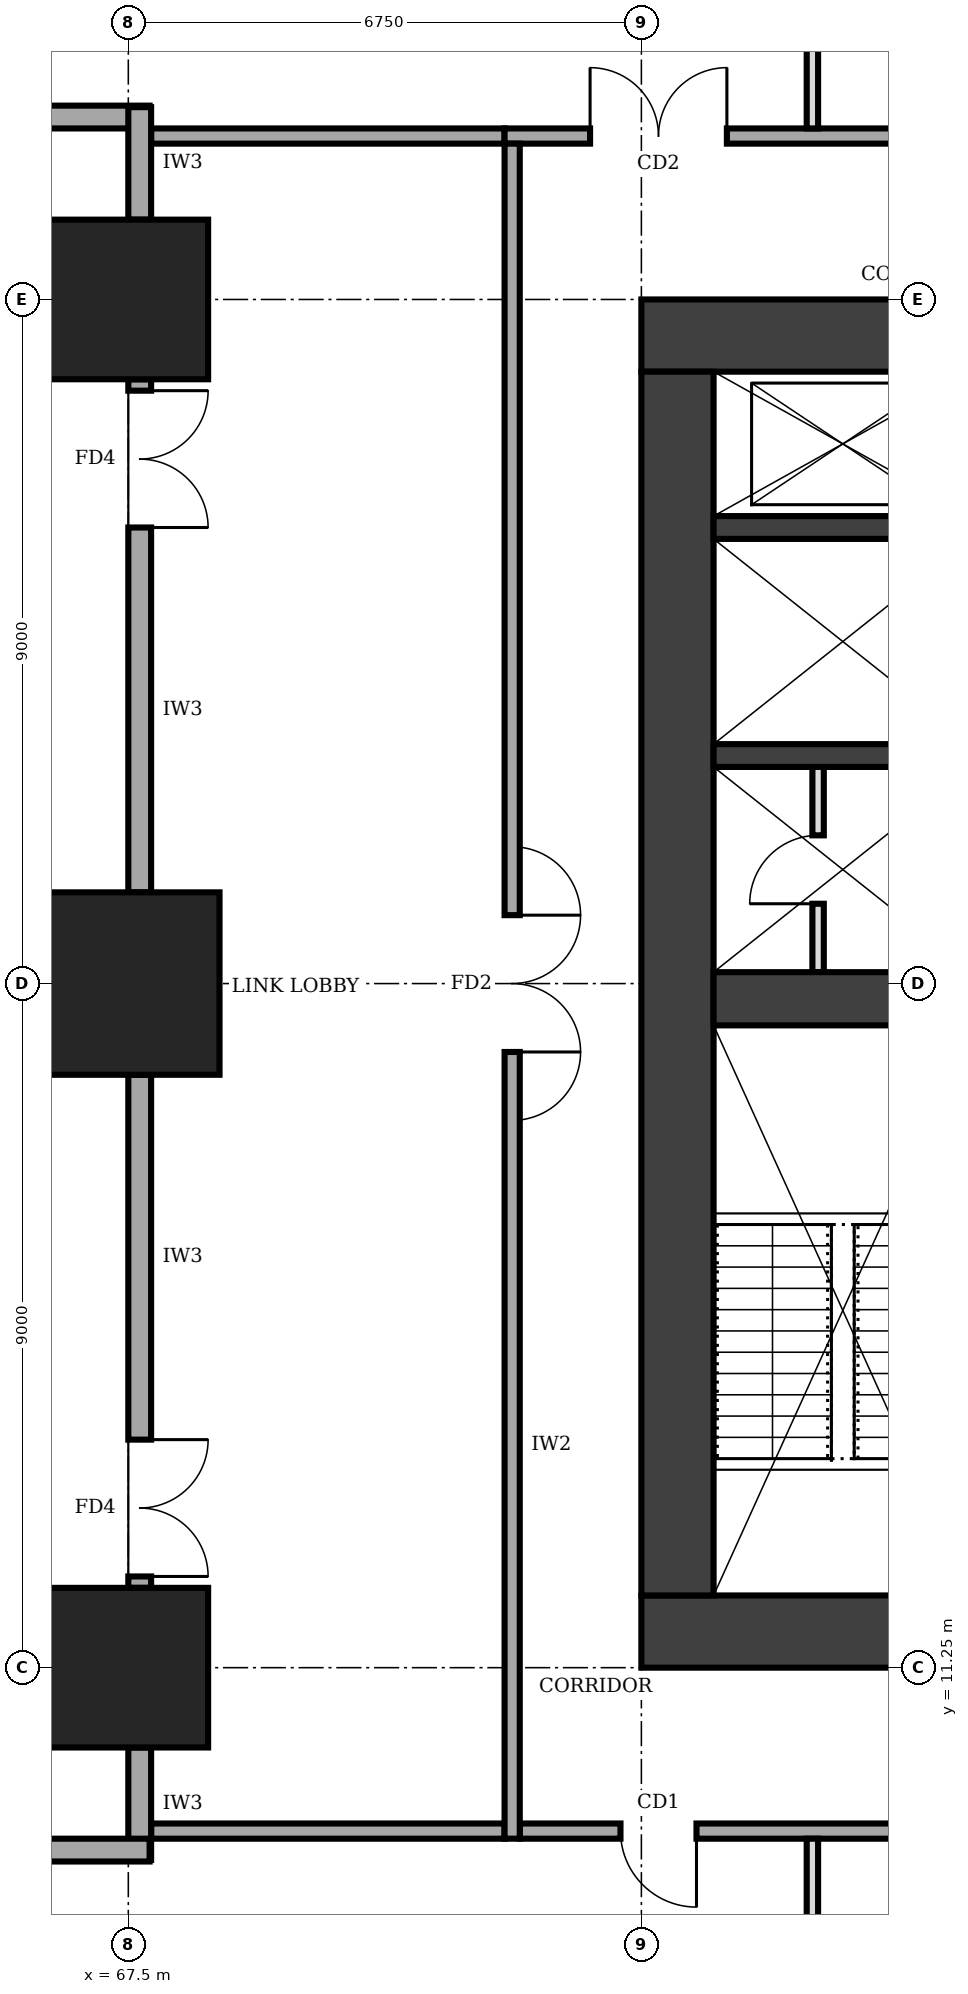
"""IFC4 building model, lengths in metres.
Left out: names, types, materials, properties, quantities, classifications, styles, units other than length and angle.
Written with IfcOpenShell. Run it as: python <this file> out.ifc"""

import sys

from ifc_helpers import new_model, si_unit, direction, frame, frame_2d, origin, origin_2d, place, context, subcontext, project, spatial, rectangle, extrude, element, fill, save


model = new_model("IFC4")
c1 = context("Model", 3, precision=1e-05, world=origin(), true_north=direction((0.0, 1.0)))
c2 = subcontext(c1, "Body", "Model", "MODEL_VIEW")
j1 = project(units=[si_unit("LENGTHUNIT", "METRE"), si_unit("PLANEANGLEUNIT", "RADIAN")], contexts=[c1])
p1 = place(None, origin())
s1 = spatial("IfcSite", under=j1, at=p1, CompositionType="ELEMENT")
p2 = place(p1, origin())
s2 = spatial("IfcBuilding", under=s1, at=p2, CompositionType="ELEMENT")
p3 = place(p2, frame((0.0, 0.0, 129.0)))
s3 = spatial("IfcBuildingStorey", under=s2, at=p3, CompositionType="ELEMENT", Elevation=129.0)
p4 = place(p3, frame((74.25, 11.725, 0.0), z_axis=(0.0, 0.0, 1.0), x_axis=(1.0, 0.0, 0.0)))
e1 = element("IfcWall", 1, at=p4, inside=s3, PredefinedType="SHEAR", context=c2, shape_type="SweptSolid", body=[
    extrude(rectangle(XDim=13.5, YDim=0.95, at=frame_2d((6.75, 0.0))), origin(), (0.0, 0.0, 1.0), 4.0),
])
p5 = place(p4, frame((4.75, 0.0, 0.0)))
e2 = element("IfcOpeningElement", 2, at=p5, cuts=e1, PredefinedType="OPENING", context=c2, shape_type="SweptSolid", body=[
    extrude(rectangle(XDim=1.0, YDim=2.1, at=frame_2d((0.5, 1.05))), frame((0.0, 0.485, 0.0), z_axis=(0.0, -1.0, 0.0), x_axis=(1.0, 0.0, 0.0)), (0.0, 0.0, 1.0), 0.97),
])
p6 = place(p3, frame((87.75, 28.775, 0.0), z_axis=(0.0, 0.0, 1.0), x_axis=(-1.0, 0.0, 0.0)))
e3 = element("IfcWall", 3, at=p6, inside=s3, PredefinedType="SHEAR", context=c2, shape_type="SweptSolid", body=[
    extrude(rectangle(XDim=13.5, YDim=0.95, at=frame_2d((6.75, 0.0))), origin(), (0.0, 0.0, 1.0), 4.0),
])
p7 = place(p6, frame((4.75, 0.0, 0.0)))
e4 = element("IfcOpeningElement", 4, at=p7, cuts=e3, PredefinedType="OPENING", context=c2, shape_type="SweptSolid", body=[
    extrude(rectangle(XDim=1.8, YDim=2.1, at=frame_2d((0.9, 1.05))), frame((0.0, 0.485, 0.0), z_axis=(0.0, -1.0, 0.0), x_axis=(1.0, 0.0, 0.0)), (0.0, 0.0, 1.0), 0.97),
])
p8 = place(p3, frame((74.725, 28.3, 0.0), z_axis=(0.0, 0.0, 1.0), x_axis=(0.0, -1.0, 0.0)))
e5 = element("IfcWall", 5, at=p8, inside=s3, PredefinedType="SHEAR", context=c2, shape_type="SweptSolid", body=[
    extrude(rectangle(XDim=16.1, YDim=0.95, at=frame_2d((8.05, 0.0))), origin(), (0.0, 0.0, 1.0), 4.0),
])
p9 = place(p3, frame((75.2, 20.05, 0.0), z_axis=(0.0, 0.0, 1.0), x_axis=(1.0, 0.0, 0.0)))
e6 = element("IfcWall", 6, at=p9, inside=s3, PredefinedType="SHEAR", context=c2, shape_type="SweptSolid", body=[
    extrude(rectangle(XDim=3.4, YDim=0.7, at=frame_2d((1.7, 0.0))), origin(), (0.0, 0.0, 1.0), 4.0),
])
for number, where, z_axis, x_axis in (
    (7, (75.2, 23.25, 0.0), (0.0, 0.0, 1.0), (1.0, 0.0, 0.0)),
    (8, (75.2, 26.25, 0.0), (0.0, 0.0, 1.0), (1.0, 0.0, 0.0)),
):
    element("IfcWall", number, at=place(p3, frame(where, z_axis=z_axis, x_axis=x_axis)), inside=s3, PredefinedType="SHEAR", context=c2, shape_type="SweptSolid", body=[
        extrude(rectangle(XDim=3.4, YDim=0.3, at=frame_2d((1.7, 0.0))), origin(), (0.0, 0.0, 1.0), 4.0),
    ])
p10 = place(p3, frame((67.5, 11.25, 0.0), z_axis=(0.0, 0.0, 1.0), x_axis=(1.0, 0.0, 0.0)))
e9 = element("IfcColumn", 9, at=p10, inside=s3, PredefinedType="COLUMN", context=c2, shape_type="SweptSolid", body=[
    extrude(rectangle(XDim=2.1, YDim=2.1, at=origin_2d()), origin(), (0.0, 0.0, 1.0), 4.0),
])
p11 = place(p3, frame((67.5, 20.25, 0.0), z_axis=(0.0, 0.0, 1.0), x_axis=(1.0, 0.0, 0.0)))
e10 = element("IfcColumn", 10, at=p11, inside=s3, PredefinedType="COLUMN", context=c2, shape_type="SweptSolid", body=[
    extrude(rectangle(XDim=2.4, YDim=2.4, at=origin_2d()), origin(), (0.0, 0.0, 1.0), 4.0),
])
p12 = place(p3, frame((67.5, 29.25, 0.0), z_axis=(0.0, 0.0, 1.0), x_axis=(1.0, 0.0, 0.0)))
e11 = element("IfcColumn", 11, at=p12, inside=s3, PredefinedType="COLUMN", context=c2, shape_type="SweptSolid", body=[
    extrude(rectangle(XDim=2.1, YDim=2.1, at=origin_2d()), origin(), (0.0, 0.0, 1.0), 4.0),
])
p13 = place(p3, frame((63.02, 31.65, 0.0), z_axis=(0.0, 0.0, 1.0), x_axis=(1.0, 0.0, 0.0)))
e12 = element("IfcWall", 12, at=p13, inside=s3, PredefinedType="SOLIDWALL", context=c2, shape_type="SweptSolid", body=[
    extrude(rectangle(XDim=4.76, YDim=0.3, at=frame_2d((2.38, 0.0))), origin(), (0.0, 0.0, 1.0), 3.75),
])
p14 = place(p3, frame((67.65, 31.78, 0.0), z_axis=(0.0, 0.0, 1.0), x_axis=(0.0, -1.0, 0.0)))
e13 = element("IfcWall", 13, at=p14, inside=s3, PredefinedType="SOLIDWALL", context=c2, shape_type="SweptSolid", body=[
    extrude(rectangle(XDim=1.48, YDim=0.3, at=frame_2d((0.74, 0.0))), origin(), (0.0, 0.0, 1.0), 2.65),
])
p15 = place(p3, frame((67.65, 28.2, 0.0), z_axis=(0.0, 0.0, 1.0), x_axis=(0.0, -1.0, 0.0)))
e14 = element("IfcWall", 14, at=p15, inside=s3, PredefinedType="SOLIDWALL", context=c2, shape_type="SweptSolid", body=[
    extrude(rectangle(XDim=6.75, YDim=0.3, at=frame_2d((3.375, 0.0))), origin(), (0.0, 0.0, 1.0), 2.65),
])
p16 = place(p15, frame((0.15, 0.0, 0.0)))
e15 = element("IfcOpeningElement", 15, at=p16, cuts=e14, PredefinedType="OPENING", context=c2, shape_type="SweptSolid", body=[
    extrude(rectangle(XDim=1.8, YDim=2.1, at=frame_2d((0.9, 1.05))), frame((0.0, 0.16, 0.0), z_axis=(0.0, -1.0, 0.0), x_axis=(1.0, 0.0, 0.0)), (0.0, 0.0, 1.0), 0.32),
])
p17 = place(p3, frame((67.65, 19.05, 0.0), z_axis=(0.0, 0.0, 1.0), x_axis=(0.0, -1.0, 0.0)))
e16 = element("IfcWall", 16, at=p17, inside=s3, PredefinedType="SOLIDWALL", context=c2, shape_type="SweptSolid", body=[
    extrude(rectangle(XDim=6.75, YDim=0.3, at=frame_2d((3.375, 0.0))), origin(), (0.0, 0.0, 1.0), 2.65),
])
p18 = place(p17, frame((4.8, 0.0, 0.0)))
e17 = element("IfcOpeningElement", 17, at=p18, cuts=e16, PredefinedType="OPENING", context=c2, shape_type="SweptSolid", body=[
    extrude(rectangle(XDim=1.8, YDim=2.1, at=frame_2d((0.9, 1.05))), frame((0.0, 0.16, 0.0), z_axis=(0.0, -1.0, 0.0), x_axis=(1.0, 0.0, 0.0)), (0.0, 0.0, 1.0), 0.32),
])
p19 = place(p3, frame((67.65, 10.2, 0.0), z_axis=(0.0, 0.0, 1.0), x_axis=(0.0, -1.0, 0.0)))
e18 = element("IfcWall", 18, at=p19, inside=s3, PredefinedType="SOLIDWALL", context=c2, shape_type="SweptSolid", body=[
    extrude(rectangle(XDim=1.48, YDim=0.3, at=frame_2d((0.74, 0.0))), origin(), (0.0, 0.0, 1.0), 2.65),
])
p20 = place(p3, frame((67.78, 8.85, 0.0), z_axis=(0.0, 0.0, 1.0), x_axis=(-1.0, 0.0, 0.0)))
e19 = element("IfcWall", 19, at=p20, inside=s3, PredefinedType="SOLIDWALL", context=c2, shape_type="SweptSolid", body=[
    extrude(rectangle(XDim=4.76, YDim=0.3, at=frame_2d((2.38, 0.0))), origin(), (0.0, 0.0, 1.0), 3.75),
])
p21 = place(p3, frame((76.575, 20.4, 0.0), z_axis=(0.0, 0.0, 1.0), x_axis=(0.0, 1.0, 0.0)))
e20 = element("IfcWall", 20, at=p21, inside=s3, PredefinedType="PARTITIONING", context=c2, shape_type="SweptSolid", body=[
    extrude(rectangle(XDim=2.7, YDim=0.15, at=frame_2d((1.35, 0.0))), origin(), (0.0, 0.0, 1.0), 3.75),
])
p22 = place(p21, frame((0.9, 0.0, 0.0)))
e21 = element("IfcOpeningElement", 21, at=p22, cuts=e20, PredefinedType="OPENING", context=c2, shape_type="SweptSolid", body=[
    extrude(rectangle(XDim=0.9, YDim=2.1, at=frame_2d((0.45, 1.05))), frame((0.0, 0.085, 0.0), z_axis=(0.0, -1.0, 0.0), x_axis=(1.0, 0.0, 0.0)), (0.0, 0.0, 1.0), 0.17),
])
p23 = place(p3, frame((72.65, 9.1, 0.0), z_axis=(0.0, 0.0, 1.0), x_axis=(1.0, 0.0, 0.0)))
e22 = element("IfcWall", 22, at=p23, inside=s3, PredefinedType="SOLIDWALL", context=c2, shape_type="SweptSolid", body=[
    extrude(rectangle(XDim=16.9, YDim=0.2, at=frame_2d((8.45, 0.0))), origin(), (0.0, 0.0, 1.0), 3.75),
])
p24 = place(p23, frame((1.325, 0.0, 0.0)))
e23 = element("IfcOpeningElement", 23, at=p24, cuts=e22, PredefinedType="OPENING", context=c2, shape_type="SweptSolid", body=[
    extrude(rectangle(XDim=1.0, YDim=2.1, at=frame_2d((0.5, 1.05))), frame((0.0, 0.11, 0.0), z_axis=(0.0, -1.0, 0.0), x_axis=(1.0, 0.0, 0.0)), (0.0, 0.0, 1.0), 0.22),
])
p25 = place(p23, frame((5.6, 0.0, 0.0)))
e24 = element("IfcOpeningElement", 24, at=p25, cuts=e22, PredefinedType="OPENING", context=c2, shape_type="SweptSolid", body=[
    extrude(rectangle(XDim=1.0, YDim=2.1, at=frame_2d((0.5, 1.05))), frame((0.0, 0.11, 0.0), z_axis=(0.0, -1.0, 0.0), x_axis=(1.0, 0.0, 0.0)), (0.0, 0.0, 1.0), 0.22),
])
p26 = place(p23, frame((12.125, 0.0, 0.0)))
e25 = element("IfcOpeningElement", 25, at=p26, cuts=e22, PredefinedType="OPENING", context=c2, shape_type="SweptSolid", body=[
    extrude(rectangle(XDim=1.0, YDim=2.1, at=frame_2d((0.5, 1.05))), frame((0.0, 0.11, 0.0), z_axis=(0.0, -1.0, 0.0), x_axis=(1.0, 0.0, 0.0)), (0.0, 0.0, 1.0), 0.22),
])
p27 = place(p3, frame((89.35, 31.4, 0.0), z_axis=(0.0, 0.0, 1.0), x_axis=(-1.0, 0.0, 0.0)))
e26 = element("IfcWall", 26, at=p27, inside=s3, PredefinedType="SOLIDWALL", context=c2, shape_type="SweptSolid", body=[
    extrude(rectangle(XDim=16.9, YDim=0.2, at=frame_2d((8.45, 0.0))), origin(), (0.0, 0.0, 1.0), 3.75),
])
p28 = place(p27, frame((13.975, 0.0, 0.0)))
e27 = element("IfcOpeningElement", 27, at=p28, cuts=e26, PredefinedType="OPENING", context=c2, shape_type="SweptSolid", body=[
    extrude(rectangle(XDim=1.8, YDim=2.1, at=frame_2d((0.9, 1.05))), frame((0.0, 0.11, 0.0), z_axis=(0.0, -1.0, 0.0), x_axis=(1.0, 0.0, 0.0)), (0.0, 0.0, 1.0), 0.22),
])
p29 = place(p27, frame((7.85, 0.0, 0.0)))
e28 = element("IfcOpeningElement", 28, at=p29, cuts=e26, PredefinedType="OPENING", context=c2, shape_type="SweptSolid", body=[
    extrude(rectangle(XDim=1.0, YDim=2.1, at=frame_2d((0.5, 1.05))), frame((0.0, 0.11, 0.0), z_axis=(0.0, -1.0, 0.0), x_axis=(1.0, 0.0, 0.0)), (0.0, 0.0, 1.0), 0.22),
])
p30 = place(p27, frame((1.325, 0.0, 0.0)))
e29 = element("IfcOpeningElement", 29, at=p30, cuts=e26, PredefinedType="OPENING", context=c2, shape_type="SweptSolid", body=[
    extrude(rectangle(XDim=1.0, YDim=2.1, at=frame_2d((0.5, 1.05))), frame((0.0, 0.11, 0.0), z_axis=(0.0, -1.0, 0.0), x_axis=(1.0, 0.0, 0.0)), (0.0, 0.0, 1.0), 0.22),
])
p31 = place(p3, frame((72.55, 31.3, 0.0), z_axis=(0.0, 0.0, 1.0), x_axis=(0.0, -1.0, 0.0)))
e30 = element("IfcWall", 30, at=p31, inside=s3, PredefinedType="SOLIDWALL", context=c2, shape_type="SweptSolid", body=[
    extrude(rectangle(XDim=22.3, YDim=0.2, at=frame_2d((11.15, 0.0))), origin(), (0.0, 0.0, 1.0), 3.75),
])
p32 = place(p31, frame((10.15, 0.0, 0.0)))
e31 = element("IfcOpeningElement", 31, at=p32, cuts=e30, PredefinedType="OPENING", context=c2, shape_type="SweptSolid", body=[
    extrude(rectangle(XDim=1.8, YDim=2.1, at=frame_2d((0.9, 1.05))), frame((0.0, 0.11, 0.0), z_axis=(0.0, -1.0, 0.0), x_axis=(1.0, 0.0, 0.0)), (0.0, 0.0, 1.0), 0.22),
])
for number, where, z_axis, x_axis in (
    (32, (67.8, 9.1, 0.0), (0.0, 0.0, 1.0), (1.0, 0.0, 0.0)),
    (33, (67.8, 31.4, 0.0), (0.0, 0.0, 1.0), (1.0, 0.0, 0.0)),
):
    element("IfcWall", number, at=place(p3, frame(where, z_axis=z_axis, x_axis=x_axis)), inside=s3, PredefinedType="SOLIDWALL", context=c2, shape_type="SweptSolid", body=[
        extrude(rectangle(XDim=4.65, YDim=0.2, at=frame_2d((2.325, 0.0))), origin(), (0.0, 0.0, 1.0), 3.75),
    ])
p33 = place(p3, frame((76.5, 3.6, 0.0), z_axis=(0.0, 0.0, 1.0), x_axis=(0.0, 1.0, 0.0)))
e34 = element("IfcWall", 34, at=p33, inside=s3, PredefinedType="PARTITIONING", context=c2, shape_type="SweptSolid", body=[
    extrude(rectangle(XDim=5.4, YDim=0.15, at=frame_2d((2.7, 0.0))), origin(), (0.0, 0.0, 1.0), 3.75),
])
p34 = place(p3, frame((76.5, 31.5, 0.0), z_axis=(0.0, 0.0, 1.0), x_axis=(0.0, 1.0, 0.0)))
e35 = element("IfcWall", 35, at=p34, inside=s3, PredefinedType="PARTITIONING", context=c2, shape_type="SweptSolid", body=[
    extrude(rectangle(XDim=8.7, YDim=0.15, at=frame_2d((4.35, 0.0))), origin(), (0.0, 0.0, 1.0), 3.75),
])
for number, where, z_axis, x_axis in (
    (36, (63.5, 15.1, 0.0), (0.0, 0.0, 1.0), (1.0, 0.0, 0.0)),
    (37, (63.5, 25.4, 0.0), (0.0, 0.0, 1.0), (1.0, 0.0, 0.0)),
):
    element("IfcWall", number, at=place(p3, frame(where, z_axis=z_axis, x_axis=x_axis)), inside=s3, PredefinedType="SOLIDWALL", context=c2, shape_type="SweptSolid", body=[
        extrude(rectangle(XDim=4.0, YDim=0.2, at=frame_2d((2.0, 0.0))), origin(), (0.0, 0.0, 1.0), 3.75),
    ])
p35 = place(p22, origin())
e38 = element("IfcDoor", 38, at=p35, inside=s3, OperationType="SINGLE_SWING_LEFT", PredefinedType="DOOR", context=c2, shape_type="SweptSolid", body=[
    extrude(rectangle(XDim=0.9, YDim=2.1, at=frame_2d((0.45, 1.05))), frame((0.0, 0.025, 0.0), z_axis=(0.0, -1.0, 0.0), x_axis=(1.0, 0.0, 0.0)), (0.0, 0.0, 1.0), 0.05),
])
fill(e21, e38)
p36 = place(p24, frame((1.0, 0.0, 0.0), z_axis=(0.0, 0.0, 1.0), x_axis=(-1.0, 0.0, 0.0)))
e39 = element("IfcDoor", 39, at=p36, inside=s3, OperationType="SINGLE_SWING_LEFT", PredefinedType="DOOR", context=c2, shape_type="SweptSolid", body=[
    extrude(rectangle(XDim=1.0, YDim=2.1, at=frame_2d((0.5, 1.05))), frame((0.0, 0.025, 0.0), z_axis=(0.0, -1.0, 0.0), x_axis=(1.0, 0.0, 0.0)), (0.0, 0.0, 1.0), 0.05),
])
fill(e23, e39)
p37 = place(p28, frame((1.8, 0.0, 0.0), z_axis=(0.0, 0.0, 1.0), x_axis=(-1.0, 0.0, 0.0)))
e40 = element("IfcDoor", 40, at=p37, inside=s3, OperationType="DOUBLE_DOOR_SINGLE_SWING", PredefinedType="DOOR", context=c2, shape_type="SweptSolid", body=[
    extrude(rectangle(XDim=1.8, YDim=2.1, at=frame_2d((0.9, 1.05))), frame((0.0, 0.025, 0.0), z_axis=(0.0, -1.0, 0.0), x_axis=(1.0, 0.0, 0.0)), (0.0, 0.0, 1.0), 0.05),
])
fill(e27, e40)
p38 = place(p32, origin())
e41 = element("IfcDoor", 41, at=p38, inside=s3, OperationType="DOUBLE_DOOR_SINGLE_SWING", PredefinedType="DOOR", context=c2, shape_type="SweptSolid", body=[
    extrude(rectangle(XDim=1.8, YDim=2.1, at=frame_2d((0.9, 1.05))), frame((0.0, 0.025, 0.0), z_axis=(0.0, -1.0, 0.0), x_axis=(1.0, 0.0, 0.0)), (0.0, 0.0, 1.0), 0.05),
])
fill(e31, e41)
p39 = place(p16, origin())
e42 = element("IfcDoor", 42, at=p39, inside=s3, OperationType="DOUBLE_DOOR_SINGLE_SWING", PredefinedType="DOOR", context=c2, shape_type="SweptSolid", body=[
    extrude(rectangle(XDim=1.8, YDim=2.1, at=frame_2d((0.9, 1.05))), frame((0.0, 0.025, 0.0), z_axis=(0.0, -1.0, 0.0), x_axis=(1.0, 0.0, 0.0)), (0.0, 0.0, 1.0), 0.05),
])
fill(e15, e42)
p40 = place(p18, origin())
e43 = element("IfcDoor", 43, at=p40, inside=s3, OperationType="DOUBLE_DOOR_SINGLE_SWING", PredefinedType="DOOR", context=c2, shape_type="SweptSolid", body=[
    extrude(rectangle(XDim=1.8, YDim=2.1, at=frame_2d((0.9, 1.05))), frame((0.0, 0.025, 0.0), z_axis=(0.0, -1.0, 0.0), x_axis=(1.0, 0.0, 0.0)), (0.0, 0.0, 1.0), 0.05),
])
fill(e17, e43)
save(model, sys.argv[1])
